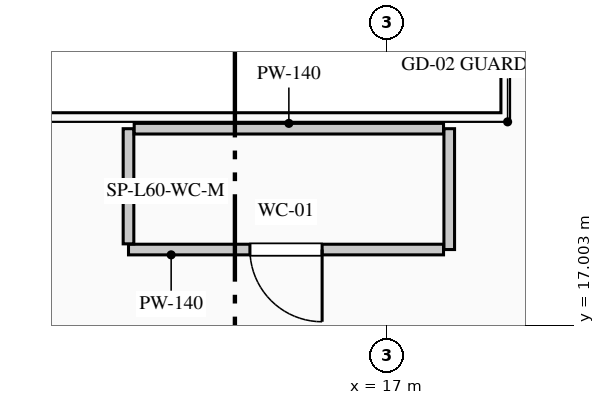
"""IFC4 building model, lengths in metres.
Left out: names, types, materials, properties, quantities, classifications, styles, units other than length and angle.
Written with IfcOpenShell. Run it as: python <this file> out.ifc"""

import sys

from ifc_helpers import new_model, si_unit, direction, frame, frame_2d, origin, place, context, subcontext, project, spatial, rectangle, extrude, element, fill, save


model = new_model("IFC4")
c1 = context("Model", 3, precision=1e-05, world=origin(), true_north=direction((0.0, 1.0)))
c2 = subcontext(c1, "Body", "Model", "MODEL_VIEW")
j1 = project(units=[si_unit("LENGTHUNIT", "METRE"), si_unit("PLANEANGLEUNIT", "RADIAN")], contexts=[c1])
p1 = place(None, origin())
s1 = spatial("IfcSite", under=j1, at=p1, CompositionType="ELEMENT")
p2 = place(p1, origin())
s2 = spatial("IfcBuilding", under=s1, at=p2, CompositionType="ELEMENT")
p3 = place(p2, frame((0.0, 0.0, 250.9)))
s3 = spatial("IfcBuildingStorey", under=s2, at=p3, CompositionType="ELEMENT", Elevation=250.9)
p4 = place(p3, frame((17.82, 19.59, 0.0), z_axis=(0.0, 0.0, 1.0), x_axis=(0.0, -1.0, 0.0)))
e1 = element("IfcWall", 1, at=p4, inside=s3, PredefinedType="PARTITIONING", context=c2, shape_type="SweptSolid", body=[
    extrude(rectangle(XDim=1.59, YDim=0.14, at=frame_2d((0.795, 0.0))), origin(), (0.0, 0.0, 1.0), 5.55),
])
p5 = place(p3, frame((17.745, 18.0, 0.0), z_axis=(0.0, 0.0, 1.0), x_axis=(-1.0, 0.0, 0.0)))
e2 = element("IfcWall", 2, at=p5, inside=s3, PredefinedType="PARTITIONING", context=c2, shape_type="SweptSolid", body=[
    extrude(rectangle(XDim=4.145, YDim=0.14, at=frame_2d((2.073, 0.0))), origin(), (0.0, 0.0, 1.0), 5.55),
])
p6 = place(p5, frame((1.597, 0.0, 0.0)))
e3 = element("IfcOpeningElement", 3, at=p6, cuts=e2, PredefinedType="OPENING", context=c2, shape_type="SweptSolid", body=[
    extrude(rectangle(XDim=0.95, YDim=2.15, at=frame_2d((0.475, 1.075))), frame((0.0, 0.08, 0.0), z_axis=(0.0, -1.0, 0.0), x_axis=(1.0, 0.0, 0.0)), (0.0, 0.0, 1.0), 0.16),
])
p7 = place(p3, frame((13.6, 18.075, 0.0), z_axis=(0.0, 0.0, 1.0), x_axis=(0.0, 1.0, 0.0)))
e4 = element("IfcWall", 4, at=p7, inside=s3, PredefinedType="PARTITIONING", context=c2, shape_type="SweptSolid", body=[
    extrude(rectangle(XDim=1.515, YDim=0.14, at=frame_2d((0.758, 0.0))), origin(), (0.0, 0.0, 1.0), 5.55),
])
p8 = place(p3, frame((13.675, 19.59, 0.0), z_axis=(0.0, 0.0, 1.0), x_axis=(1.0, 0.0, 0.0)))
e5 = element("IfcWall", 5, at=p8, inside=s3, PredefinedType="PARTITIONING", context=c2, shape_type="SweptSolid", body=[
    extrude(rectangle(XDim=4.07, YDim=0.14, at=frame_2d((2.035, 0.0))), origin(), (0.0, 0.0, 1.0), 5.55),
])
p9 = place(p6, origin())
e6 = element("IfcDoor", 6, at=p9, inside=s3, OperationType="SINGLE_SWING_LEFT", PredefinedType="DOOR", context=c2, shape_type="SweptSolid", body=[
    extrude(rectangle(XDim=0.95, YDim=2.15, at=frame_2d((0.475, 1.075))), frame((0.0, 0.025, 0.0), z_axis=(0.0, -1.0, 0.0), x_axis=(1.0, 0.0, 0.0)), (0.0, 0.0, 1.0), 0.05),
])
fill(e3, e6)
save(model, sys.argv[1])
